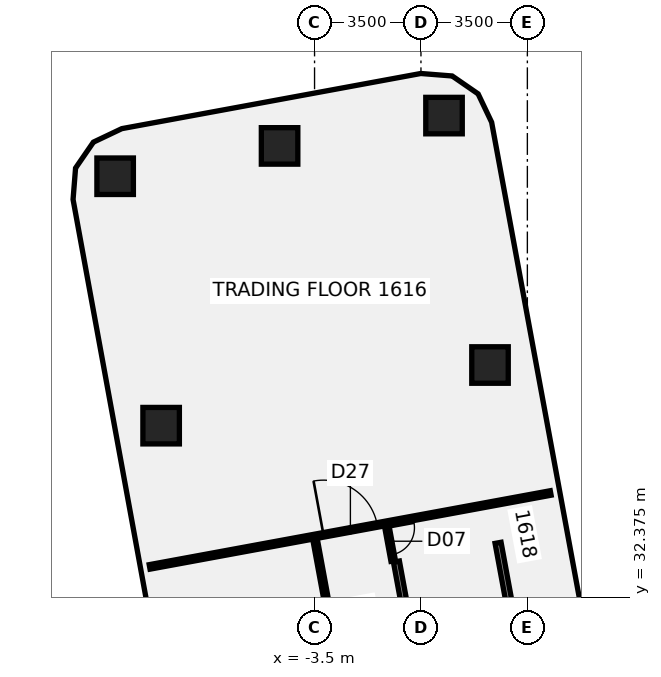
"""IFC4 building model, lengths in metres.
Left out: names, types, materials, properties, quantities, classifications, styles, units other than length and angle.
Written with IfcOpenShell. Run it as: python <this file> out.ifc"""

import sys

from ifc_helpers import new_model, si_unit, direction, frame, frame_2d, origin, origin_2d, place, context, subcontext, project, spatial, polyline, rectangle, outline, extrude, element, fill, save


model = new_model("IFC4")
c1 = context("Model", 3, precision=1e-05, world=origin(), true_north=direction((0.0, 1.0)))
c2 = subcontext(c1, "Body", "Model", "MODEL_VIEW")
j1 = project(units=[si_unit("LENGTHUNIT", "METRE"), si_unit("PLANEANGLEUNIT", "RADIAN")], contexts=[c1])
p1 = place(None, origin())
s1 = spatial("IfcSite", under=j1, at=p1, CompositionType="ELEMENT")
p2 = place(p1, origin())
s2 = spatial("IfcBuilding", under=s1, at=p2, CompositionType="ELEMENT")
p3 = place(p2, frame((0.0, 0.0, 71.5)))
s3 = spatial("IfcBuildingStorey", under=s2, at=p3, CompositionType="ELEMENT", Elevation=71.5)
p4 = place(p3, frame((-8.546, 38.016, -0.138), z_axis=(-0.077174601835, -0.042059833465, 0.996130037315), x_axis=(0.98024372476, 0.179297504528, 0.083514339719)))
e1 = element("IfcColumn", 1, at=p4, inside=s3, PredefinedType="COLUMN", context=c2, shape_type="SweptSolid", body=[
    extrude(rectangle(XDim=1.2, YDim=1.2, at=origin_2d()), origin(), (0.0, 0.0, 1.0), 3.761),
])
p5 = place(p3, frame((2.271, 40.01, -0.138), z_axis=(-0.087370111162, 0.010255926868, 0.996123124739), x_axis=(0.179712819987, -0.98337843556, 0.025887348398)))
e2 = element("IfcColumn", 2, at=p5, inside=s3, PredefinedType="COLUMN", context=c2, shape_type="SweptSolid", body=[
    extrude(rectangle(XDim=1.2, YDim=1.2, at=origin_2d()), origin(), (0.0, 0.0, 1.0), 3.761),
])
p6 = place(p3, frame((0.759, 48.214, -0.139), z_axis=(-0.125729090029, -0.001163559702, 0.992063930424), x_axis=(0.18017355573, -0.983395866032, 0.021680878368)))
e3 = element("IfcColumn", 3, at=p6, inside=s3, PredefinedType="COLUMN", context=c2, shape_type="SweptSolid", body=[
    extrude(rectangle(XDim=1.2, YDim=1.2, at=origin_2d()), origin(), (0.0, 0.0, 1.0), 3.777),
])
p7 = place(p3, frame((-4.65, 47.217, -0.139), z_axis=(-0.120709628458, -0.027219471655, 0.992314610373), x_axis=(0.975884236543, 0.179893711362, 0.123645499225)))
e4 = element("IfcColumn", 4, at=p7, inside=s3, PredefinedType="COLUMN", context=c2, shape_type="SweptSolid", body=[
    extrude(rectangle(XDim=1.2, YDim=1.2, at=origin_2d()), origin(), (0.0, 0.0, 1.0), 3.776),
])
p8 = place(p3, frame((-10.059, 46.219, -0.138), z_axis=(-0.115622079585, -0.053190034376, 0.99186811369), x_axis=(0.976300483641, 0.177830515493, 0.123343720563)))
e5 = element("IfcColumn", 5, at=p8, inside=s3, PredefinedType="COLUMN", context=c2, shape_type="SweptSolid", body=[
    extrude(rectangle(XDim=1.2, YDim=1.2, at=origin_2d()), origin(), (0.0, 0.0, 1.0), 3.778),
])
p9 = place(p3, frame((-3.487, 34.296, 0.0), z_axis=(0.0, 0.0, 1.0), x_axis=(0.181322644979, -0.983423661713, 0.0)))
e6 = element("IfcWall", 6, at=p9, inside=s3, PredefinedType="PARTITIONING", context=c2, shape_type="SweptSolid", body=[
    extrude(rectangle(XDim=11.325, YDim=0.15, at=frame_2d((5.663, 0.0))), origin(), (0.0, 0.0, 1.0), 3.01),
])
p10 = place(p9, frame((9.375, 0.0, 0.0)))
e7 = element("IfcOpeningElement", 7, at=p10, cuts=e6, PredefinedType="OPENING", context=c2, shape_type="SweptSolid", body=[
    extrude(rectangle(XDim=1.0, YDim=2.1, at=frame_2d((0.5, 1.05))), frame((0.0, 0.085, 0.0), z_axis=(0.0, -1.0, 0.0), x_axis=(1.0, 0.0, 0.0)), (0.0, 0.0, 1.0), 0.17),
])
p11 = place(p9, frame((5.175, 0.0, 0.0)))
e8 = element("IfcOpeningElement", 8, at=p11, cuts=e6, PredefinedType="OPENING", context=c2, shape_type="SweptSolid", body=[
    extrude(rectangle(XDim=0.9, YDim=2.1, at=frame_2d((0.45, 1.05))), frame((0.0, 0.085, 0.0), z_axis=(0.0, -1.0, 0.0), x_axis=(1.0, 0.0, 0.0)), (0.0, 0.0, 1.0), 0.17),
])
p12 = place(p3, frame((-1.127, 34.731, 0.0), z_axis=(0.0, 0.0, 1.0), x_axis=(0.181388013835, -0.983411606824, 0.0)))
e9 = element("IfcWall", 9, at=p12, inside=s3, PredefinedType="PARTITIONING", context=c2, shape_type="SweptSolid", body=[
    extrude(rectangle(XDim=1.184, YDim=0.15, at=frame_2d((0.592, 0.0))), origin(), (0.0, 0.0, 1.0), 3.01),
])
p13 = place(p12, frame((0.075, 0.0, 0.0)))
e10 = element("IfcOpeningElement", 10, at=p13, cuts=e9, PredefinedType="OPENING", context=c2, shape_type="SweptSolid", body=[
    extrude(rectangle(XDim=0.9, YDim=2.1, at=frame_2d((0.45, 1.05))), frame((0.0, 0.085, 0.0), z_axis=(0.0, -1.0, 0.0), x_axis=(1.0, 0.0, 0.0)), (0.0, 0.0, 1.0), 0.17),
])
p14 = place(p3, frame((-8.925, 33.37, 0.0), z_axis=(0.0, 0.0, 1.0), x_axis=(0.983428688749, 0.181295378169, 0.0)))
e11 = element("IfcWall", 11, at=p14, inside=s3, PredefinedType="PARTITIONING", context=c2, shape_type="SweptSolid", body=[
    extrude(rectangle(XDim=13.414, YDim=0.15, at=frame_2d((6.707, 0.0))), origin(), (0.0, 0.0, 1.0), 3.01),
])
p15 = place(p14, frame((5.815, 0.0, 0.0)))
e12 = element("IfcOpeningElement", 12, at=p15, cuts=e11, PredefinedType="OPENING", context=c2, shape_type="SweptSolid", body=[
    extrude(rectangle(XDim=1.8, YDim=2.1, at=frame_2d((0.9, 1.05))), frame((0.0, 0.085, 0.0), z_axis=(0.0, -1.0, 0.0), x_axis=(1.0, 0.0, 0.0)), (0.0, 0.0, 1.0), 0.17),
])
p16 = place(p3, frame((0.408, 26.956, -0.14), z_axis=(0.0, 0.0, 1.0), x_axis=(-0.181321949703, 0.983423789907, 0.0)))
e13 = element("IfcWall", 13, at=p16, inside=s3, PredefinedType="SHEAR", context=c2, shape_type="SweptSolid", body=[
    extrude(rectangle(XDim=6.7, YDim=0.2, at=frame_2d((3.35, 0.0))), origin(), (0.0, 0.0, 1.0), 3.15),
])
p17 = place(p16, frame((0.35, 0.0, 0.0)))
e14 = element("IfcOpeningElement", 14, at=p17, cuts=e13, PredefinedType="OPENING", context=c2, shape_type="SweptSolid", body=[
    extrude(rectangle(XDim=1.0, YDim=2.1, at=frame_2d((0.5, 1.05))), frame((0.0, 0.11, 0.0), z_axis=(0.0, -1.0, 0.0), x_axis=(1.0, 0.0, 0.0)), (0.0, 0.0, 1.0), 0.22),
])
p18 = place(p3, frame((3.752, 27.573, -0.14), z_axis=(0.0, 0.0, 1.0), x_axis=(-0.181357190614, 0.983417291597, 0.0)))
e15 = element("IfcWall", 15, at=p18, inside=s3, PredefinedType="SHEAR", context=c2, shape_type="SweptSolid", body=[
    extrude(rectangle(XDim=6.7, YDim=0.2, at=frame_2d((3.35, 0.0))), origin(), (0.0, 0.0, 1.0), 3.15),
])
p19 = place(p3, frame((0.0, 0.0, -0.14)))
e16 = element("IfcWall", 16, at=p19, inside=s3, PredefinedType="SHEAR", context=c2, shape_type="SweptSolid", body=[
    extrude(outline(polyline([(2.475, 33.947), (2.438, 34.144), (-0.709, 33.563), (-0.672, 33.366), (2.475, 33.947)])), origin(), (0.0, 0.0, 1.0), 3.15),
])
p20 = place(p13, origin())
e17 = element("IfcDoor", 17, at=p20, inside=s3, OperationType="SINGLE_SWING_RIGHT", PredefinedType="DOOR", context=c2, shape_type="SweptSolid", body=[
    extrude(rectangle(XDim=0.9, YDim=2.1, at=frame_2d((0.45, 1.05))), frame((0.0, 0.025, 0.0), z_axis=(0.0, -1.0, 0.0), x_axis=(1.0, 0.0, 0.0)), (0.0, 0.0, 1.0), 0.05),
])
fill(e10, e17)
p21 = place(p15, origin())
e18 = element("IfcDoor", 18, at=p21, inside=s3, OperationType="DOUBLE_DOOR_SINGLE_SWING", PredefinedType="DOOR", context=c2, shape_type="SweptSolid", body=[
    extrude(rectangle(XDim=1.8, YDim=2.1, at=frame_2d((0.9, 1.05))), frame((0.0, 0.025, 0.0), z_axis=(0.0, -1.0, 0.0), x_axis=(1.0, 0.0, 0.0)), (0.0, 0.0, 1.0), 0.05),
])
fill(e12, e18)
save(model, sys.argv[1])
